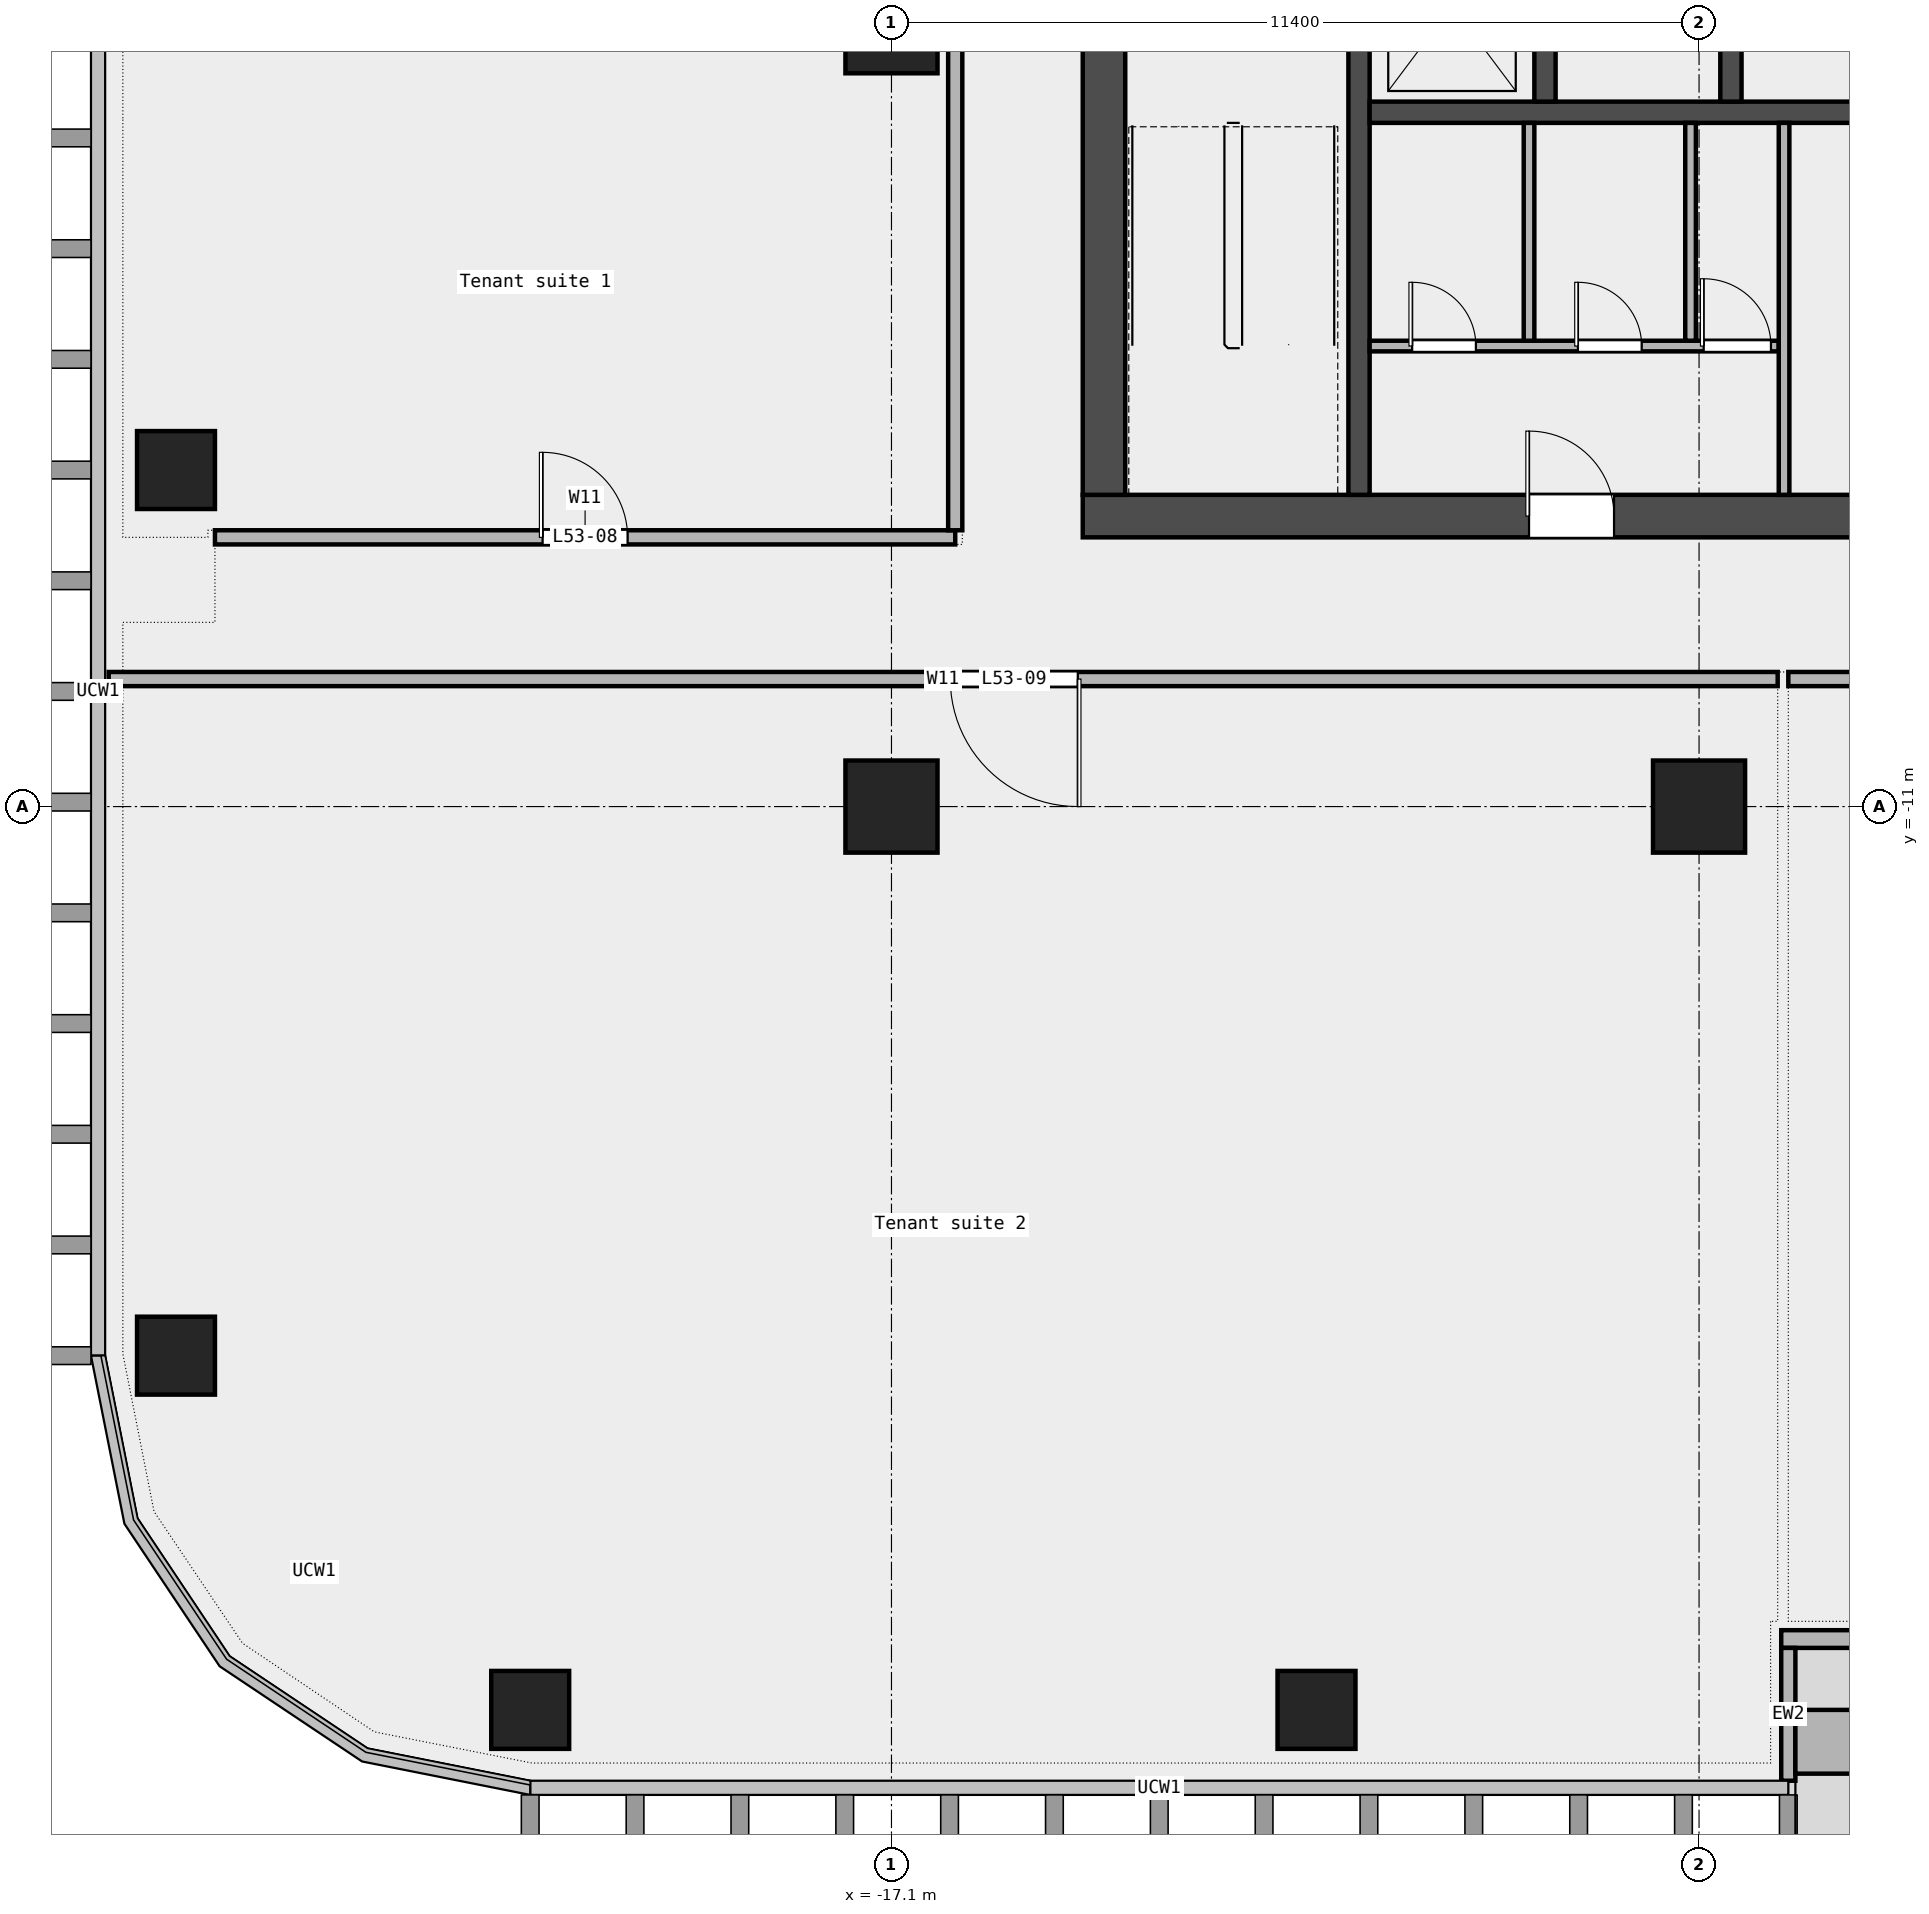
"""IFC4 building model, lengths in metres.
Left out: names, types, materials, properties, quantities, classifications, styles, units other than length and angle.
Written with IfcOpenShell. Run it as: python <this file> out.ifc"""

import sys

from ifc_helpers import new_model, si_unit, direction, frame, frame_2d, origin, origin_2d, place, context, subcontext, project, spatial, rectangle, extrude, element, fill, save


model = new_model("IFC4")
c1 = context("Model", 3, precision=1e-05, world=origin(), true_north=direction((0.0, 1.0)))
c2 = subcontext(c1, "Body", "Model", "MODEL_VIEW")
j1 = project(units=[si_unit("LENGTHUNIT", "METRE"), si_unit("PLANEANGLEUNIT", "RADIAN")], contexts=[c1])
p1 = place(None, origin())
s1 = spatial("IfcSite", under=j1, at=p1, CompositionType="ELEMENT")
p2 = place(p1, origin())
s2 = spatial("IfcBuilding", under=s1, at=p2, CompositionType="ELEMENT")
p3 = place(p2, frame((0.0, 0.0, 247.0)))
s3 = spatial("IfcBuildingStorey", under=s2, at=p3, CompositionType="ELEMENT", Elevation=247.0)
for number, where, z_axis, x_axis in (
    (1, (-22.2, -23.75, 0.0), (0.0, 0.0, 1.0), (1.0, 0.0, 0.0)),
    (2, (-11.1, -23.75, 0.0), (0.0, 0.0, 1.0), (1.0, 0.0, 0.0)),
    (3, (-27.2, -6.25, 0.0), (0.0, 0.0, 1.0), (1.0, 0.0, 0.0)),
    (4, (-27.2, -18.75, 0.0), (0.0, 0.0, 1.0), (1.0, 0.0, 0.0)),
):
    element("IfcColumn", number, at=place(p3, frame(where, z_axis=z_axis, x_axis=x_axis)), inside=s3, PredefinedType="COLUMN", context=c2, shape_type="SweptSolid", body=[
        extrude(rectangle(XDim=1.1, YDim=1.1, at=origin_2d()), origin(), (0.0, 0.0, 1.0), 3.6),
    ])
for number, where, z_axis, x_axis in (
    (5, (-17.1, -11.0, 0.0), (0.0, 0.0, 1.0), (1.0, 0.0, 0.0)),
    (6, (-17.1, 0.0, 0.0), (0.0, 0.0, 1.0), (1.0, 0.0, 0.0)),
    (7, (-5.7, -11.0, 0.0), (0.0, 0.0, 1.0), (1.0, 0.0, 0.0)),
):
    element("IfcColumn", number, at=place(p3, frame(where, z_axis=z_axis, x_axis=x_axis)), inside=s3, PredefinedType="COLUMN", context=c2, shape_type="SweptSolid", body=[
        extrude(rectangle(XDim=1.3, YDim=1.3, at=origin_2d()), origin(), (0.0, 0.0, 1.0), 3.6),
    ])
p4 = place(p3, frame((-4.54, -22.75, 0.0), z_axis=(0.0, 0.0, 1.0), x_axis=(1.0, 0.0, 0.0)))
e8 = element("IfcWall", 8, at=p4, inside=s3, PredefinedType="STANDARD", context=c2, shape_type="SweptSolid", body=[
    extrude(rectangle(XDim=13.52, YDim=0.25, at=frame_2d((6.76, 0.0))), origin(), (0.0, 0.0, 1.0), 3.6),
])
p5 = place(p4, frame((1.5, 0.0, 0.45)))
e9 = element("IfcOpeningElement", 9, at=p5, cuts=e8, PredefinedType="OPENING", context=c2, shape_type="SweptSolid", body=[
    extrude(rectangle(XDim=1.5, YDim=2.4, at=frame_2d((0.75, 1.2))), frame((0.0, 0.137, 0.0), z_axis=(0.0, -1.0, 0.0), x_axis=(1.0, 0.0, 0.0)), (0.0, 0.0, 1.0), 0.274),
])
p6 = place(p4, frame((5.75, 0.0, 0.0)))
e10 = element("IfcOpeningElement", 10, at=p6, cuts=e8, PredefinedType="OPENING", context=c2, shape_type="SweptSolid", body=[
    extrude(rectangle(XDim=1.8, YDim=2.4, at=frame_2d((0.9, 1.2))), frame((0.0, 0.137, 0.0), z_axis=(0.0, -1.0, 0.0), x_axis=(1.0, 0.0, 0.0)), (0.0, 0.0, 1.0), 0.274),
])
p7 = place(p4, frame((10.5, 0.0, 0.45)))
e11 = element("IfcOpeningElement", 11, at=p7, cuts=e8, PredefinedType="OPENING", context=c2, shape_type="SweptSolid", body=[
    extrude(rectangle(XDim=1.5, YDim=2.4, at=frame_2d((0.75, 1.2))), frame((0.0, 0.137, 0.0), z_axis=(0.0, -1.0, 0.0), x_axis=(1.0, 0.0, 0.0)), (0.0, 0.0, 1.0), 0.274),
])
p8 = place(p3, frame((-4.44, -24.75, 0.0), z_axis=(0.0, 0.0, 1.0), x_axis=(0.0, 1.0, 0.0)))
e12 = element("IfcWall", 12, at=p8, inside=s3, PredefinedType="STANDARD", context=c2, shape_type="SweptSolid", body=[
    extrude(rectangle(XDim=1.875, YDim=0.2, at=frame_2d((0.938, 0.0))), origin(), (0.0, 0.0, 1.0), 3.6),
])
p9 = place(p3, frame((-4.34, -24.2, 0.0), z_axis=(0.0, 0.0, 1.0), x_axis=(1.0, 0.0, 0.0)))
e13 = element("IfcWall", 13, at=p9, inside=s3, PredefinedType="STANDARD", context=c2, shape_type="SweptSolid", body=[
    extrude(rectangle(XDim=3.6, YDim=0.9, at=frame_2d((1.8, 0.0))), origin(), (0.0, 0.0, 1.0), 0.7),
])
p10 = place(p3, frame((-28.15, -9.2, 0.0), z_axis=(0.0, 0.0, 1.0), x_axis=(1.0, 0.0, 0.0)))
e14 = element("IfcWall", 14, at=p10, inside=s3, PredefinedType="PARTITIONING", context=c2, shape_type="SweptSolid", body=[
    extrude(rectangle(XDim=23.56, YDim=0.2, at=frame_2d((11.78, 0.0))), origin(), (0.0, 0.0, 1.0), 3.6),
])
p11 = place(p10, frame((11.88, 0.0, 0.0)))
e15 = element("IfcOpeningElement", 15, at=p11, cuts=e14, PredefinedType="OPENING", context=c2, shape_type="SweptSolid", body=[
    extrude(rectangle(XDim=1.8, YDim=2.1, at=frame_2d((0.9, 1.05))), frame((0.0, 0.112, 0.0), z_axis=(0.0, -1.0, 0.0), x_axis=(1.0, 0.0, 0.0)), (0.0, 0.0, 1.0), 0.224),
])
p12 = place(p3, frame((-4.44, -9.2, 0.0), z_axis=(0.0, 0.0, 1.0), x_axis=(1.0, 0.0, 0.0)))
e16 = element("IfcWall", 16, at=p12, inside=s3, PredefinedType="PARTITIONING", context=c2, shape_type="SweptSolid", body=[
    extrude(rectangle(XDim=32.59, YDim=0.2, at=frame_2d((16.295, 0.0))), origin(), (0.0, 0.0, 1.0), 3.6),
])
p13 = place(p12, frame((25.525, 0.0, 0.0)))
e17 = element("IfcOpeningElement", 17, at=p13, cuts=e16, PredefinedType="OPENING", context=c2, shape_type="SweptSolid", body=[
    extrude(rectangle(XDim=1.8, YDim=2.1, at=frame_2d((0.9, 1.05))), frame((0.0, 0.112, 0.0), z_axis=(0.0, -1.0, 0.0), x_axis=(1.0, 0.0, 0.0)), (0.0, 0.0, 1.0), 0.224),
])
p14 = place(p12, frame((5.76, 0.0, 0.0)))
e18 = element("IfcOpeningElement", 18, at=p14, cuts=e16, PredefinedType="OPENING", context=c2, shape_type="SweptSolid", body=[
    extrude(rectangle(XDim=1.8, YDim=2.1, at=frame_2d((0.9, 1.05))), frame((0.0, 0.112, 0.0), z_axis=(0.0, -1.0, 0.0), x_axis=(1.0, 0.0, 0.0)), (0.0, 0.0, 1.0), 0.224),
])
p15 = place(p12, frame((16.14, 0.0, 0.0)))
e19 = element("IfcOpeningElement", 19, at=p15, cuts=e16, PredefinedType="OPENING", context=c2, shape_type="SweptSolid", body=[
    extrude(rectangle(XDim=1.5, YDim=2.1, at=frame_2d((0.75, 1.05))), frame((0.0, 0.112, 0.0), z_axis=(0.0, -1.0, 0.0), x_axis=(1.0, 0.0, 0.0)), (0.0, 0.0, 1.0), 0.224),
])
p16 = place(p3, frame((-26.65, -7.2, 0.0), z_axis=(0.0, 0.0, 1.0), x_axis=(1.0, 0.0, 0.0)))
e20 = element("IfcWall", 20, at=p16, inside=s3, PredefinedType="PARTITIONING", context=c2, shape_type="SweptSolid", body=[
    extrude(rectangle(XDim=10.45, YDim=0.2, at=frame_2d((5.225, 0.0))), origin(), (0.0, 0.0, 1.0), 3.6),
])
p17 = place(p16, frame((4.625, 0.0, 0.0)))
e21 = element("IfcOpeningElement", 21, at=p17, cuts=e20, PredefinedType="OPENING", context=c2, shape_type="SweptSolid", body=[
    extrude(rectangle(XDim=1.2, YDim=2.1, at=frame_2d((0.6, 1.05))), frame((0.0, 0.112, 0.0), z_axis=(0.0, -1.0, 0.0), x_axis=(1.0, 0.0, 0.0)), (0.0, 0.0, 1.0), 0.224),
])
p18 = place(p3, frame((-16.2, -7.1, 0.0), z_axis=(0.0, 0.0, 1.0), x_axis=(0.0, 1.0, 0.0)))
e22 = element("IfcWall", 22, at=p18, inside=s3, PredefinedType="PARTITIONING", context=c2, shape_type="SweptSolid", body=[
    extrude(rectangle(XDim=20.5, YDim=0.2, at=frame_2d((10.25, 0.0))), origin(), (0.0, 0.0, 1.0), 3.6),
])
p19 = place(p18, frame((13.05, 0.0, 0.0)))
e23 = element("IfcOpeningElement", 23, at=p19, cuts=e22, PredefinedType="OPENING", context=c2, shape_type="SweptSolid", body=[
    extrude(rectangle(XDim=1.5, YDim=2.1, at=frame_2d((0.75, 1.05))), frame((0.0, 0.112, 0.0), z_axis=(0.0, -1.0, 0.0), x_axis=(1.0, 0.0, 0.0)), (0.0, 0.0, 1.0), 0.224),
])
p20 = place(p3, frame((-14.4, -6.9, 0.0), z_axis=(0.0, 0.0, 1.0), x_axis=(1.0, 0.0, 0.0)))
e24 = element("IfcWall", 24, at=p20, inside=s3, PredefinedType="SHEAR", context=c2, shape_type="SweptSolid", body=[
    extrude(rectangle(XDim=28.8, YDim=0.6, at=frame_2d((14.4, 0.0))), origin(), (0.0, 0.0, 1.0), 3.7),
])
p21 = place(p20, frame((6.3, 0.0, 0.0)))
e25 = element("IfcOpeningElement", 25, at=p21, cuts=e24, PredefinedType="OPENING", context=c2, shape_type="SweptSolid", body=[
    extrude(rectangle(XDim=1.2, YDim=2.1, at=frame_2d((0.6, 1.05))), frame((0.0, 0.312, 0.0), z_axis=(0.0, -1.0, 0.0), x_axis=(1.0, 0.0, 0.0)), (0.0, 0.0, 1.0), 0.624),
])
p22 = place(p20, frame((10.9, 0.0, 0.0)))
e26 = element("IfcOpeningElement", 26, at=p22, cuts=e24, PredefinedType="OPENING", context=c2, shape_type="SweptSolid", body=[
    extrude(rectangle(XDim=1.0, YDim=2.1, at=frame_2d((0.5, 1.05))), frame((0.0, 0.312, 0.0), z_axis=(0.0, -1.0, 0.0), x_axis=(1.0, 0.0, 0.0)), (0.0, 0.0, 1.0), 0.624),
])
p23 = place(p20, frame((14.462, 0.0, 0.0)))
e27 = element("IfcOpeningElement", 27, at=p23, cuts=e24, PredefinedType="OPENING", context=c2, shape_type="SweptSolid", body=[
    extrude(rectangle(XDim=1.0, YDim=2.1, at=frame_2d((0.5, 1.05))), frame((0.0, 0.312, 0.0), z_axis=(0.0, -1.0, 0.0), x_axis=(1.0, 0.0, 0.0)), (0.0, 0.0, 1.0), 0.624),
])
p24 = place(p20, frame((18.75, 0.0, 0.0)))
e28 = element("IfcOpeningElement", 28, at=p24, cuts=e24, PredefinedType="OPENING", context=c2, shape_type="SweptSolid", body=[
    extrude(rectangle(XDim=1.8, YDim=2.1, at=frame_2d((0.9, 1.05))), frame((0.0, 0.312, 0.0), z_axis=(0.0, -1.0, 0.0), x_axis=(1.0, 0.0, 0.0)), (0.0, 0.0, 1.0), 0.624),
])
p25 = place(p20, frame((23.087, 0.0, 0.0)))
e29 = element("IfcOpeningElement", 29, at=p25, cuts=e24, PredefinedType="OPENING", context=c2, shape_type="SweptSolid", body=[
    extrude(rectangle(XDim=1.0, YDim=2.1, at=frame_2d((0.5, 1.05))), frame((0.0, 0.312, 0.0), z_axis=(0.0, -1.0, 0.0), x_axis=(1.0, 0.0, 0.0)), (0.0, 0.0, 1.0), 0.624),
])
p26 = place(p3, frame((-14.1, -6.6, 0.0), z_axis=(0.0, 0.0, 1.0), x_axis=(0.0, 1.0, 0.0)))
e30 = element("IfcWall", 30, at=p26, inside=s3, PredefinedType="SHEAR", context=c2, shape_type="SweptSolid", body=[
    extrude(rectangle(XDim=19.5, YDim=0.6, at=frame_2d((9.75, 0.0))), origin(), (0.0, 0.0, 1.0), 3.7),
])
p27 = place(p26, frame((9.3, 0.0, 0.0)))
e31 = element("IfcOpeningElement", 31, at=p27, cuts=e30, PredefinedType="OPENING", context=c2, shape_type="SweptSolid", body=[
    extrude(rectangle(XDim=1.8, YDim=2.1, at=frame_2d((0.9, 1.05))), frame((0.0, 0.312, 0.0), z_axis=(0.0, -1.0, 0.0), x_axis=(1.0, 0.0, 0.0)), (0.0, 0.0, 1.0), 0.624),
])
p28 = place(p3, frame((-10.5, -6.6, 0.0), z_axis=(0.0, 0.0, 1.0), x_axis=(0.0, 1.0, 0.0)))
e32 = element("IfcWall", 32, at=p28, inside=s3, PredefinedType="SHEAR", context=c2, shape_type="SweptSolid", body=[
    extrude(rectangle(XDim=8.55, YDim=0.3, at=frame_2d((4.275, 0.0))), origin(), (0.0, 0.0, 1.0), 3.7),
])
p29 = place(p3, frame((-10.35, -1.2, 0.0), z_axis=(0.0, 0.0, 1.0), x_axis=(1.0, 0.0, 0.0)))
e33 = element("IfcWall", 33, at=p29, inside=s3, PredefinedType="SOLIDWALL", context=c2, shape_type="SweptSolid", body=[
    extrude(rectangle(XDim=20.7, YDim=0.3, at=frame_2d((10.35, 0.0))), origin(), (0.0, 0.0, 1.0), 3.7),
])
for number, where, z_axis, x_axis in (
    (34, (-7.875, -1.05, 0.0), (0.0, 0.0, 1.0), (0.0, 1.0, 0.0)),
    (35, (-5.25, -1.05, 0.0), (0.0, 0.0, 1.0), (0.0, 1.0, 0.0)),
):
    element("IfcWall", number, at=place(p3, frame(where, z_axis=z_axis, x_axis=x_axis)), inside=s3, PredefinedType="SOLIDWALL", context=c2, shape_type="SweptSolid", body=[
        extrude(rectangle(XDim=2.7, YDim=0.3, at=frame_2d((1.35, 0.0))), origin(), (0.0, 0.0, 1.0), 3.7),
    ])
p30 = place(p3, frame((-10.35, -4.5, 0.0), z_axis=(0.0, 0.0, 1.0), x_axis=(1.0, 0.0, 0.0)))
e36 = element("IfcWall", 36, at=p30, inside=s3, PredefinedType="PARTITIONING", context=c2, shape_type="SweptSolid", body=[
    extrude(rectangle(XDim=5.775, YDim=0.15, at=frame_2d((2.888, 0.0))), origin(), (0.0, 0.0, 1.0), 3.7),
])
p31 = place(p30, frame((0.6, 0.0, 0.0)))
e37 = element("IfcOpeningElement", 37, at=p31, cuts=e36, PredefinedType="OPENING", context=c2, shape_type="SweptSolid", body=[
    extrude(rectangle(XDim=0.9, YDim=2.1, at=frame_2d((0.45, 1.05))), frame((0.0, 0.087, 0.0), z_axis=(0.0, -1.0, 0.0), x_axis=(1.0, 0.0, 0.0)), (0.0, 0.0, 1.0), 0.174),
])
p32 = place(p30, frame((2.94, 0.0, 0.0)))
e38 = element("IfcOpeningElement", 38, at=p32, cuts=e36, PredefinedType="OPENING", context=c2, shape_type="SweptSolid", body=[
    extrude(rectangle(XDim=0.9, YDim=2.1, at=frame_2d((0.45, 1.05))), frame((0.0, 0.087, 0.0), z_axis=(0.0, -1.0, 0.0), x_axis=(1.0, 0.0, 0.0)), (0.0, 0.0, 1.0), 0.174),
])
p33 = place(p30, frame((4.715, 0.0, 0.0)))
e39 = element("IfcOpeningElement", 39, at=p33, cuts=e36, PredefinedType="OPENING", context=c2, shape_type="SweptSolid", body=[
    extrude(rectangle(XDim=0.95, YDim=2.1, at=frame_2d((0.475, 1.05))), frame((0.0, 0.087, 0.0), z_axis=(0.0, -1.0, 0.0), x_axis=(1.0, 0.0, 0.0)), (0.0, 0.0, 1.0), 0.174),
])
for number, where, z_axis, x_axis in (
    (40, (-8.1, -4.425, 0.0), (0.0, 0.0, 1.0), (0.0, 1.0, 0.0)),
    (41, (-5.82, -4.425, 0.0), (0.0, 0.0, 1.0), (0.0, 1.0, 0.0)),
):
    element("IfcWall", number, at=place(p3, frame(where, z_axis=z_axis, x_axis=x_axis)), inside=s3, PredefinedType="PARTITIONING", context=c2, shape_type="SweptSolid", body=[
        extrude(rectangle(XDim=3.075, YDim=0.15, at=frame_2d((1.538, 0.0))), origin(), (0.0, 0.0, 1.0), 3.7),
    ])
p34 = place(p3, frame((-4.5, -6.6, 0.0), z_axis=(0.0, 0.0, 1.0), x_axis=(0.0, 1.0, 0.0)))
e42 = element("IfcWall", 42, at=p34, inside=s3, PredefinedType="PARTITIONING", context=c2, shape_type="SweptSolid", body=[
    extrude(rectangle(XDim=5.25, YDim=0.15, at=frame_2d((2.625, 0.0))), origin(), (0.0, 0.0, 1.0), 3.7),
])
p35 = place(p17, origin())
e43 = element("IfcDoor", 43, at=p35, inside=s3, OperationType="SINGLE_SWING_LEFT", PredefinedType="DOOR", context=c2, shape_type="SweptSolid", body=[
    extrude(rectangle(XDim=1.2, YDim=2.1, at=frame_2d((0.6, 1.05))), frame((0.0, 0.025, 0.0), z_axis=(0.0, -1.0, 0.0), x_axis=(1.0, 0.0, 0.0)), (0.0, 0.0, 1.0), 0.05),
])
fill(e21, e43)
p36 = place(p11, origin())
e44 = element("IfcDoor", 44, at=p36, inside=s3, OperationType="DOUBLE_DOOR_SINGLE_SWING", PredefinedType="DOOR", context=c2, shape_type="SweptSolid", body=[
    extrude(rectangle(XDim=1.8, YDim=2.1, at=frame_2d((0.9, 1.05))), frame((0.0, 0.025, 0.0), z_axis=(0.0, -1.0, 0.0), x_axis=(1.0, 0.0, 0.0)), (0.0, 0.0, 1.0), 0.05),
])
fill(e15, e44)
p37 = place(p21, origin())
e45 = element("IfcDoor", 45, at=p37, inside=s3, OperationType="SINGLE_SWING_LEFT", PredefinedType="DOOR", context=c2, shape_type="SweptSolid", body=[
    extrude(rectangle(XDim=1.2, YDim=2.1, at=frame_2d((0.6, 1.05))), frame((0.0, 0.025, 0.0), z_axis=(0.0, -1.0, 0.0), x_axis=(1.0, 0.0, 0.0)), (0.0, 0.0, 1.0), 0.05),
])
fill(e25, e45)
p38 = place(p31, origin())
e46 = element("IfcDoor", 46, at=p38, inside=s3, OperationType="SINGLE_SWING_LEFT", PredefinedType="DOOR", context=c2, shape_type="SweptSolid", body=[
    extrude(rectangle(XDim=0.9, YDim=2.1, at=frame_2d((0.45, 1.05))), frame((0.0, 0.025, 0.0), z_axis=(0.0, -1.0, 0.0), x_axis=(1.0, 0.0, 0.0)), (0.0, 0.0, 1.0), 0.05),
])
fill(e37, e46)
p39 = place(p32, origin())
e47 = element("IfcDoor", 47, at=p39, inside=s3, OperationType="SINGLE_SWING_LEFT", PredefinedType="DOOR", context=c2, shape_type="SweptSolid", body=[
    extrude(rectangle(XDim=0.9, YDim=2.1, at=frame_2d((0.45, 1.05))), frame((0.0, 0.025, 0.0), z_axis=(0.0, -1.0, 0.0), x_axis=(1.0, 0.0, 0.0)), (0.0, 0.0, 1.0), 0.05),
])
fill(e38, e47)
p40 = place(p33, origin())
e48 = element("IfcDoor", 48, at=p40, inside=s3, OperationType="SINGLE_SWING_LEFT", PredefinedType="DOOR", context=c2, shape_type="SweptSolid", body=[
    extrude(rectangle(XDim=0.95, YDim=2.1, at=frame_2d((0.475, 1.05))), frame((0.0, 0.025, 0.0), z_axis=(0.0, -1.0, 0.0), x_axis=(1.0, 0.0, 0.0)), (0.0, 0.0, 1.0), 0.05),
])
fill(e39, e48)
save(model, sys.argv[1])
